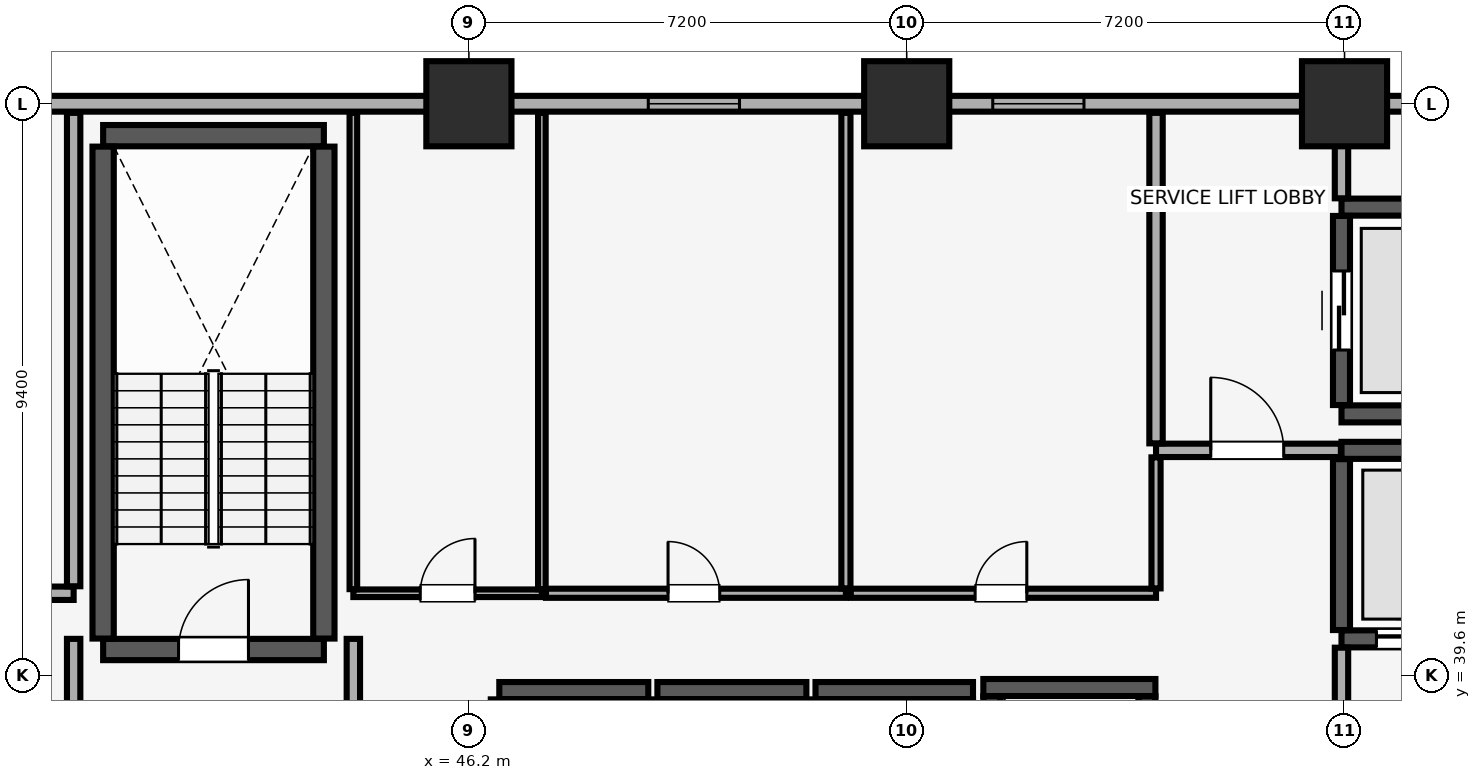
"""IFC4 building model, lengths in metres.
Left out: names, types, materials, properties, quantities, classifications, styles, units other than length and angle.
Written with IfcOpenShell. Run it as: python <this file> out.ifc"""

import sys

from ifc_helpers import new_model, si_unit, direction, frame, frame_2d, origin, origin_2d, place, context, subcontext, project, spatial, rectangle, extrude, element, fill, save


model = new_model("IFC4")
c1 = context("Model", 3, precision=1e-05, world=origin(), true_north=direction((0.0, 1.0)))
c2 = subcontext(c1, "Body", "Model", "MODEL_VIEW")
j1 = project(units=[si_unit("LENGTHUNIT", "METRE"), si_unit("PLANEANGLEUNIT", "RADIAN")], contexts=[c1])
p1 = place(None, origin())
s1 = spatial("IfcSite", under=j1, at=p1, CompositionType="ELEMENT")
p2 = place(p1, origin())
s2 = spatial("IfcBuilding", under=s1, at=p2, CompositionType="ELEMENT")
p3 = place(p2, frame((0.0, 0.0, 31.4)))
s3 = spatial("IfcBuildingStorey", under=s2, at=p3, CompositionType="ELEMENT", Elevation=31.4)
for number, where, z_axis, x_axis in (
    (1, (46.2, 49.0, 0.0), (0.0, 0.0, 1.0), (1.0, 0.0, 0.0)),
    (2, (53.4, 49.0, 0.0), (0.0, 0.0, 1.0), (1.0, 0.0, 0.0)),
    (3, (60.6, 49.0, 0.0), (0.0, 0.0, 1.0), (1.0, 0.0, 0.0)),
):
    element("IfcColumn", number, at=place(p3, frame(where, z_axis=z_axis, x_axis=x_axis)), inside=s3, PredefinedType="COLUMN", context=c2, shape_type="SweptSolid", body=[
        extrude(rectangle(XDim=1.4, YDim=1.4, at=origin_2d()), origin(), (0.0, 0.0, 1.0), 3.51),
    ])
p4 = place(p3, frame((79.8, 49.0, 0.0), z_axis=(0.0, 0.0, 1.0), x_axis=(-1.0, 0.0, 0.0)))
e4 = element("IfcWall", 4, at=p4, inside=s3, PredefinedType="SOLIDWALL", context=c2, shape_type="SweptSolid", body=[
    extrude(rectangle(XDim=75.6, YDim=0.26, at=frame_2d((37.8, 0.0))), origin(), (0.0, 0.0, 1.0), 2.56),
])
p5 = place(p4, frame((72.565, 0.0, 0.85)))
e5 = element("IfcOpeningElement", 5, at=p5, cuts=e4, PredefinedType="OPENING", context=c2, shape_type="SweptSolid", body=[
    extrude(rectangle(XDim=1.5, YDim=1.4, at=frame_2d((0.75, 0.7))), frame((0.0, 0.14, 0.0), z_axis=(0.0, -1.0, 0.0), x_axis=(1.0, 0.0, 0.0)), (0.0, 0.0, 1.0), 0.28),
])
p6 = place(p4, frame((67.45, 0.0, 0.85)))
e6 = element("IfcOpeningElement", 6, at=p6, cuts=e4, PredefinedType="OPENING", context=c2, shape_type="SweptSolid", body=[
    extrude(rectangle(XDim=1.5, YDim=1.4, at=frame_2d((0.75, 0.7))), frame((0.0, 0.14, 0.0), z_axis=(0.0, -1.0, 0.0), x_axis=(1.0, 0.0, 0.0)), (0.0, 0.0, 1.0), 0.28),
])
p7 = place(p4, frame((6.65, 0.0, 0.85)))
e7 = element("IfcOpeningElement", 7, at=p7, cuts=e4, PredefinedType="OPENING", context=c2, shape_type="SweptSolid", body=[
    extrude(rectangle(XDim=1.5, YDim=1.4, at=frame_2d((0.75, 0.7))), frame((0.0, 0.14, 0.0), z_axis=(0.0, -1.0, 0.0), x_axis=(1.0, 0.0, 0.0)), (0.0, 0.0, 1.0), 0.28),
])
p8 = place(p4, frame((1.535, 0.0, 0.85)))
e8 = element("IfcOpeningElement", 8, at=p8, cuts=e4, PredefinedType="OPENING", context=c2, shape_type="SweptSolid", body=[
    extrude(rectangle(XDim=1.5, YDim=1.4, at=frame_2d((0.75, 0.7))), frame((0.0, 0.14, 0.0), z_axis=(0.0, -1.0, 0.0), x_axis=(1.0, 0.0, 0.0)), (0.0, 0.0, 1.0), 0.28),
])
p9 = place(p4, frame((51.365, 0.0, 0.9)))
e9 = element("IfcOpeningElement", 9, at=p9, cuts=e4, PredefinedType="OPENING", context=c2, shape_type="SweptSolid", body=[
    extrude(rectangle(XDim=1.5, YDim=1.4, at=frame_2d((0.75, 0.7))), frame((0.0, 0.14, 0.0), z_axis=(0.0, -1.0, 0.0), x_axis=(1.0, 0.0, 0.0)), (0.0, 0.0, 1.0), 0.28),
])
p10 = place(p4, frame((46.0, 0.0, 0.9)))
e10 = element("IfcOpeningElement", 10, at=p10, cuts=e4, PredefinedType="OPENING", context=c2, shape_type="SweptSolid", body=[
    extrude(rectangle(XDim=1.5, YDim=1.4, at=frame_2d((0.75, 0.7))), frame((0.0, 0.14, 0.0), z_axis=(0.0, -1.0, 0.0), x_axis=(1.0, 0.0, 0.0)), (0.0, 0.0, 1.0), 0.28),
])
p11 = place(p4, frame((29.15, 0.0, 0.9)))
e11 = element("IfcOpeningElement", 11, at=p11, cuts=e4, PredefinedType="OPENING", context=c2, shape_type="SweptSolid", body=[
    extrude(rectangle(XDim=1.5, YDim=1.4, at=frame_2d((0.75, 0.7))), frame((0.0, 0.14, 0.0), z_axis=(0.0, -1.0, 0.0), x_axis=(1.0, 0.0, 0.0)), (0.0, 0.0, 1.0), 0.28),
])
p12 = place(p4, frame((23.485, 0.0, 0.9)))
e12 = element("IfcOpeningElement", 12, at=p12, cuts=e4, PredefinedType="OPENING", context=c2, shape_type="SweptSolid", body=[
    extrude(rectangle(XDim=1.5, YDim=1.4, at=frame_2d((0.75, 0.7))), frame((0.0, 0.14, 0.0), z_axis=(0.0, -1.0, 0.0), x_axis=(1.0, 0.0, 0.0)), (0.0, 0.0, 1.0), 0.28),
])
p13 = place(p3, frame((40.185, 40.025, 0.0), z_axis=(0.0, 0.0, 1.0), x_axis=(1.0, 0.0, 0.0)))
e13 = element("IfcWall", 13, at=p13, inside=s3, PredefinedType="SHEAR", context=c2, shape_type="SweptSolid", body=[
    extrude(rectangle(XDim=3.63, YDim=0.35, at=frame_2d((1.815, 0.0))), origin(), (0.0, 0.0, 1.0), 3.51),
])
p14 = place(p13, frame((1.24, 0.0, 0.0)))
e14 = element("IfcOpeningElement", 14, at=p14, cuts=e13, PredefinedType="OPENING", context=c2, shape_type="SweptSolid", body=[
    extrude(rectangle(XDim=1.15, YDim=2.15, at=frame_2d((0.575, 1.075))), frame((0.0, 0.185, 0.0), z_axis=(0.0, -1.0, 0.0), x_axis=(1.0, 0.0, 0.0)), (0.0, 0.0, 1.0), 0.37),
])
p15 = place(p3, frame((40.185, 48.475, 0.0), z_axis=(0.0, 0.0, 1.0), x_axis=(1.0, 0.0, 0.0)))
e15 = element("IfcWall", 15, at=p15, inside=s3, PredefinedType="SHEAR", context=c2, shape_type="SweptSolid", body=[
    extrude(rectangle(XDim=3.63, YDim=0.35, at=frame_2d((1.815, 0.0))), origin(), (0.0, 0.0, 1.0), 3.51),
])
for number, where, z_axis, x_axis in (
    (16, (40.185, 40.205, 0.0), (0.0, 0.0, 1.0), (0.0, 1.0, 0.0)),
    (17, (43.815, 40.205, 0.0), (0.0, 0.0, 1.0), (0.0, 1.0, 0.0)),
):
    element("IfcWall", number, at=place(p3, frame(where, z_axis=z_axis, x_axis=x_axis)), inside=s3, PredefinedType="SHEAR", context=c2, shape_type="SweptSolid", body=[
        extrude(rectangle(XDim=8.09, YDim=0.35, at=frame_2d((4.045, 0.0))), origin(), (0.0, 0.0, 1.0), 3.51),
    ])
p16 = place(p3, frame((46.7, 39.35, 0.0), z_axis=(0.0, 0.0, 1.0), x_axis=(1.0, 0.0, 0.0)))
e18 = element("IfcWall", 18, at=p16, inside=s3, PredefinedType="SHEAR", context=c2, shape_type="SweptSolid", body=[
    extrude(rectangle(XDim=2.45, YDim=0.28, at=frame_2d((1.225, 0.0))), origin(), (0.0, 0.0, 1.0), 3.51),
])
for number, where, z_axis, x_axis in (
    (19, (46.7, 37.145, 0.0), (0.0, 0.0, 1.0), (0.0, 1.0, 0.0)),
    (20, (49.15, 37.145, 0.0), (0.0, 0.0, 1.0), (0.0, 1.0, 0.0)),
):
    element("IfcWall", number, at=place(p3, frame(where, z_axis=z_axis, x_axis=x_axis)), inside=s3, PredefinedType="SHEAR", context=c2, shape_type="SweptSolid", body=[
        extrude(rectangle(XDim=2.06, YDim=0.28, at=frame_2d((1.03, 0.0))), origin(), (0.0, 0.0, 1.0), 3.51),
    ])
p17 = place(p3, frame((49.3, 39.35, 0.0), z_axis=(0.0, 0.0, 1.0), x_axis=(1.0, 0.0, 0.0)))
e21 = element("IfcWall", 21, at=p17, inside=s3, PredefinedType="SHEAR", context=c2, shape_type="SweptSolid", body=[
    extrude(rectangle(XDim=2.45, YDim=0.28, at=frame_2d((1.225, 0.0))), origin(), (0.0, 0.0, 1.0), 3.51),
])
p18 = place(p3, frame((51.75, 37.145, 0.0), z_axis=(0.0, 0.0, 1.0), x_axis=(0.0, 1.0, 0.0)))
e22 = element("IfcWall", 22, at=p18, inside=s3, PredefinedType="SHEAR", context=c2, shape_type="SweptSolid", body=[
    extrude(rectangle(XDim=2.06, YDim=0.28, at=frame_2d((1.03, 0.0))), origin(), (0.0, 0.0, 1.0), 3.51),
])
p19 = place(p3, frame((51.9, 39.35, 0.0), z_axis=(0.0, 0.0, 1.0), x_axis=(1.0, 0.0, 0.0)))
e23 = element("IfcWall", 23, at=p19, inside=s3, PredefinedType="SHEAR", context=c2, shape_type="SweptSolid", body=[
    extrude(rectangle(XDim=2.59, YDim=0.28, at=frame_2d((1.295, 0.0))), origin(), (0.0, 0.0, 1.0), 3.51),
])
p20 = place(p3, frame((54.35, 37.145, 0.0), z_axis=(0.0, 0.0, 1.0), x_axis=(0.0, 1.0, 0.0)))
e24 = element("IfcWall", 24, at=p20, inside=s3, PredefinedType="SHEAR", context=c2, shape_type="SweptSolid", body=[
    extrude(rectangle(XDim=2.06, YDim=0.28, at=frame_2d((1.03, 0.0))), origin(), (0.0, 0.0, 1.0), 3.51),
])
p21 = place(p3, frame((54.66, 39.4, 0.0), z_axis=(0.0, 0.0, 1.0), x_axis=(1.0, 0.0, 0.0)))
e25 = element("IfcWall", 25, at=p21, inside=s3, PredefinedType="SHEAR", context=c2, shape_type="SweptSolid", body=[
    extrude(rectangle(XDim=2.83, YDim=0.28, at=frame_2d((1.415, 0.0))), origin(), (0.0, 0.0, 1.0), 3.51),
])
for number, where, z_axis, x_axis in (
    (26, (54.8, 37.145, 0.0), (0.0, 0.0, 1.0), (0.0, 1.0, 0.0)),
    (27, (57.35, 37.145, 0.0), (0.0, 0.0, 1.0), (0.0, 1.0, 0.0)),
):
    element("IfcWall", number, at=place(p3, frame(where, z_axis=z_axis, x_axis=x_axis)), inside=s3, PredefinedType="SHEAR", context=c2, shape_type="SweptSolid", body=[
        extrude(rectangle(XDim=2.11, YDim=0.28, at=frame_2d((1.055, 0.0))), origin(), (0.0, 0.0, 1.0), 3.51),
    ])
p22 = place(p3, frame((60.55, 40.2, 0.0), z_axis=(0.0, 0.0, 1.0), x_axis=(1.0, 0.0, 0.0)))
e28 = element("IfcWall", 28, at=p22, inside=s3, PredefinedType="SHEAR", context=c2, shape_type="SweptSolid", body=[
    extrude(rectangle(XDim=2.415, YDim=0.28, at=frame_2d((1.208, 0.0))), origin(), (0.0, 0.0, 1.0), 3.51),
])
p23 = place(p22, frame((0.575, 0.0, 0.0)))
e29 = element("IfcOpeningElement", 29, at=p23, cuts=e28, PredefinedType="OPENING", context=c2, shape_type="SweptSolid", body=[
    extrude(rectangle(XDim=1.3, YDim=2.3, at=frame_2d((0.65, 1.15))), frame((0.0, 0.15, 0.0), z_axis=(0.0, -1.0, 0.0), x_axis=(1.0, 0.0, 0.0)), (0.0, 0.0, 1.0), 0.3),
])
p24 = place(p3, frame((60.55, 43.3, 0.0), z_axis=(0.0, 0.0, 1.0), x_axis=(1.0, 0.0, 0.0)))
e30 = element("IfcWall", 30, at=p24, inside=s3, PredefinedType="SHEAR", context=c2, shape_type="SweptSolid", body=[
    extrude(rectangle(XDim=2.415, YDim=0.28, at=frame_2d((1.208, 0.0))), origin(), (0.0, 0.0, 1.0), 3.51),
])
p25 = place(p3, frame((60.55, 40.345, 0.0), z_axis=(0.0, 0.0, 1.0), x_axis=(0.0, 1.0, 0.0)))
e31 = element("IfcWall", 31, at=p25, inside=s3, PredefinedType="SHEAR", context=c2, shape_type="SweptSolid", body=[
    extrude(rectangle(XDim=2.81, YDim=0.28, at=frame_2d((1.405, 0.0))), origin(), (0.0, 0.0, 1.0), 3.51),
])
for number, where, z_axis, x_axis in (
    (32, (60.55, 43.9, 0.0), (0.0, 0.0, 1.0), (1.0, 0.0, 0.0)),
    (33, (60.55, 47.3, 0.0), (0.0, 0.0, 1.0), (1.0, 0.0, 0.0)),
):
    element("IfcWall", number, at=place(p3, frame(where, z_axis=z_axis, x_axis=x_axis)), inside=s3, PredefinedType="SHEAR", context=c2, shape_type="SweptSolid", body=[
        extrude(rectangle(XDim=2.415, YDim=0.28, at=frame_2d((1.208, 0.0))), origin(), (0.0, 0.0, 1.0), 3.51),
    ])
p26 = place(p3, frame((60.55, 44.045, 0.0), z_axis=(0.0, 0.0, 1.0), x_axis=(0.0, 1.0, 0.0)))
e34 = element("IfcWall", 34, at=p26, inside=s3, PredefinedType="SHEAR", context=c2, shape_type="SweptSolid", body=[
    extrude(rectangle(XDim=3.11, YDim=0.28, at=frame_2d((1.555, 0.0))), origin(), (0.0, 0.0, 1.0), 3.51),
])
p27 = place(p26, frame((0.905, 0.0, 0.0)))
e35 = element("IfcOpeningElement", 35, at=p27, cuts=e34, PredefinedType="OPENING", context=c2, shape_type="SweptSolid", body=[
    extrude(rectangle(XDim=1.3, YDim=2.3, at=frame_2d((0.65, 1.15))), frame((0.0, 0.15, 0.0), z_axis=(0.0, -1.0, 0.0), x_axis=(1.0, 0.0, 0.0)), (0.0, 0.0, 1.0), 0.3),
])
p28 = place(p3, frame((60.55, 34.415, 0.0), z_axis=(0.0, 0.0, 1.0), x_axis=(0.0, 1.0, 0.0)))
e36 = element("IfcWall", 36, at=p28, inside=s3, PredefinedType="PARTITIONING", context=c2, shape_type="SweptSolid", body=[
    extrude(rectangle(XDim=5.64, YDim=0.22, at=frame_2d((2.82, 0.0))), origin(), (0.0, 0.0, 1.0), 3.51),
])
for number, where, z_axis, x_axis in (
    (37, (39.7, 34.415, 0.0), (0.0, 0.0, 1.0), (0.0, 1.0, 0.0)),
    (38, (44.3, 34.415, 0.0), (0.0, 0.0, 1.0), (0.0, 1.0, 0.0)),
):
    element("IfcWall", number, at=place(p3, frame(where, z_axis=z_axis, x_axis=x_axis)), inside=s3, PredefinedType="PARTITIONING", context=c2, shape_type="SweptSolid", body=[
        extrude(rectangle(XDim=5.785, YDim=0.22, at=frame_2d((2.893, 0.0))), origin(), (0.0, 0.0, 1.0), 3.51),
    ])
p29 = place(p3, frame((57.5, 43.3, 0.0), z_axis=(0.0, 0.0, 1.0), x_axis=(1.0, 0.0, 0.0)))
e39 = element("IfcWall", 39, at=p29, inside=s3, PredefinedType="PARTITIONING", context=c2, shape_type="SweptSolid", body=[
    extrude(rectangle(XDim=3.04, YDim=0.22, at=frame_2d((1.52, 0.0))), origin(), (0.0, 0.0, 1.0), 3.51),
])
p30 = place(p29, frame((0.9, 0.0, 0.0)))
e40 = element("IfcOpeningElement", 40, at=p30, cuts=e39, PredefinedType="OPENING", context=c2, shape_type="SweptSolid", body=[
    extrude(rectangle(XDim=1.2, YDim=2.15, at=frame_2d((0.6, 1.075))), frame((0.0, 0.12, 0.0), z_axis=(0.0, -1.0, 0.0), x_axis=(1.0, 0.0, 0.0)), (0.0, 0.0, 1.0), 0.24),
])
p31 = place(p3, frame((57.5, 43.415, 0.0), z_axis=(0.0, 0.0, 1.0), x_axis=(0.0, 1.0, 0.0)))
e41 = element("IfcWall", 41, at=p31, inside=s3, PredefinedType="PARTITIONING", context=c2, shape_type="SweptSolid", body=[
    extrude(rectangle(XDim=5.435, YDim=0.22, at=frame_2d((2.718, 0.0))), origin(), (0.0, 0.0, 1.0), 3.51),
])
p32 = place(p3, frame((60.55, 47.445, 0.0), z_axis=(0.0, 0.0, 1.0), x_axis=(0.0, 1.0, 0.0)))
e42 = element("IfcWall", 42, at=p32, inside=s3, PredefinedType="PARTITIONING", context=c2, shape_type="SweptSolid", body=[
    extrude(rectangle(XDim=1.405, YDim=0.22, at=frame_2d((0.703, 0.0))), origin(), (0.0, 0.0, 1.0), 3.51),
])
p33 = place(p3, frame((35.18, 40.95, 0.0), z_axis=(0.0, 0.0, 1.0), x_axis=(1.0, 0.0, 0.0)))
e43 = element("IfcWall", 43, at=p33, inside=s3, PredefinedType="PARTITIONING", context=c2, shape_type="SweptSolid", body=[
    extrude(rectangle(XDim=4.52, YDim=0.22, at=frame_2d((2.26, 0.0))), origin(), (0.0, 0.0, 1.0), 3.51),
])
p34 = place(p33, frame((0.795, 0.0, 0.0)))
e44 = element("IfcOpeningElement", 44, at=p34, cuts=e43, PredefinedType="OPENING", context=c2, shape_type="SweptSolid", body=[
    extrude(rectangle(XDim=0.85, YDim=2.1, at=frame_2d((0.425, 1.05))), frame((0.0, 0.12, 0.0), z_axis=(0.0, -1.0, 0.0), x_axis=(1.0, 0.0, 0.0)), (0.0, 0.0, 1.0), 0.24),
])
p35 = place(p3, frame((39.7, 41.065, 0.0), z_axis=(0.0, 0.0, 1.0), x_axis=(0.0, 1.0, 0.0)))
e45 = element("IfcWall", 45, at=p35, inside=s3, PredefinedType="PARTITIONING", context=c2, shape_type="SweptSolid", body=[
    extrude(rectangle(XDim=7.785, YDim=0.22, at=frame_2d((3.893, 0.0))), origin(), (0.0, 0.0, 1.0), 3.51),
])
p36 = place(p3, frame((44.3, 40.95, 0.0), z_axis=(0.0, 0.0, 1.0), x_axis=(1.0, 0.0, 0.0)))
e46 = element("IfcWall", 46, at=p36, inside=s3, PredefinedType="PARTITIONING", context=c2, shape_type="SweptSolid", body=[
    extrude(rectangle(XDim=3.1, YDim=0.125, at=frame_2d((1.55, 0.0))), origin(), (0.0, 0.0, 1.0), 3.51),
])
p37 = place(p36, frame((1.1, 0.0, 0.0)))
e47 = element("IfcOpeningElement", 47, at=p37, cuts=e46, PredefinedType="OPENING", context=c2, shape_type="SweptSolid", body=[
    extrude(rectangle(XDim=0.9, YDim=2.1, at=frame_2d((0.45, 1.05))), frame((0.0, 0.073, 0.0), z_axis=(0.0, -1.0, 0.0), x_axis=(1.0, 0.0, 0.0)), (0.0, 0.0, 1.0), 0.145),
])
for number, where, z_axis, x_axis in (
    (48, (44.3, 41.018, 0.0), (0.0, 0.0, 1.0), (0.0, 1.0, 0.0)),
    (49, (47.4, 41.018, 0.0), (0.0, 0.0, 1.0), (0.0, 1.0, 0.0)),
):
    element("IfcWall", number, at=place(p3, frame(where, z_axis=z_axis, x_axis=x_axis)), inside=s3, PredefinedType="PARTITIONING", context=c2, shape_type="SweptSolid", body=[
        extrude(rectangle(XDim=7.833, YDim=0.125, at=frame_2d((3.916, 0.0))), origin(), (0.0, 0.0, 1.0), 3.51),
    ])
p38 = place(p3, frame((47.468, 40.95, 0.0), z_axis=(0.0, 0.0, 1.0), x_axis=(1.0, 0.0, 0.0)))
e50 = element("IfcWall", 50, at=p38, inside=s3, PredefinedType="PARTITIONING", context=c2, shape_type="SweptSolid", body=[
    extrude(rectangle(XDim=4.932, YDim=0.15, at=frame_2d((2.466, 0.0))), origin(), (0.0, 0.0, 1.0), 3.51),
])
p39 = place(p38, frame((2.008, 0.0, 0.0)))
e51 = element("IfcOpeningElement", 51, at=p39, cuts=e50, PredefinedType="OPENING", context=c2, shape_type="SweptSolid", body=[
    extrude(rectangle(XDim=0.85, YDim=2.1, at=frame_2d((0.425, 1.05))), frame((0.0, 0.085, 0.0), z_axis=(0.0, -1.0, 0.0), x_axis=(1.0, 0.0, 0.0)), (0.0, 0.0, 1.0), 0.17),
])
p40 = place(p3, frame((52.4, 41.03, 0.0), z_axis=(0.0, 0.0, 1.0), x_axis=(0.0, 1.0, 0.0)))
e52 = element("IfcWall", 52, at=p40, inside=s3, PredefinedType="PARTITIONING", context=c2, shape_type="SweptSolid", body=[
    extrude(rectangle(XDim=7.82, YDim=0.15, at=frame_2d((3.91, 0.0))), origin(), (0.0, 0.0, 1.0), 3.51),
])
p41 = place(p3, frame((52.48, 40.95, 0.0), z_axis=(0.0, 0.0, 1.0), x_axis=(1.0, 0.0, 0.0)))
e53 = element("IfcWall", 53, at=p41, inside=s3, PredefinedType="PARTITIONING", context=c2, shape_type="SweptSolid", body=[
    extrude(rectangle(XDim=5.02, YDim=0.15, at=frame_2d((2.51, 0.0))), origin(), (0.0, 0.0, 1.0), 3.51),
])
p42 = place(p41, frame((2.045, 0.0, 0.0)))
e54 = element("IfcOpeningElement", 54, at=p42, cuts=e53, PredefinedType="OPENING", context=c2, shape_type="SweptSolid", body=[
    extrude(rectangle(XDim=0.85, YDim=2.1, at=frame_2d((0.425, 1.05))), frame((0.0, 0.085, 0.0), z_axis=(0.0, -1.0, 0.0), x_axis=(1.0, 0.0, 0.0)), (0.0, 0.0, 1.0), 0.17),
])
p43 = place(p3, frame((57.5, 41.03, 0.0), z_axis=(0.0, 0.0, 1.0), x_axis=(0.0, 1.0, 0.0)))
e55 = element("IfcWall", 55, at=p43, inside=s3, PredefinedType="PARTITIONING", context=c2, shape_type="SweptSolid", body=[
    extrude(rectangle(XDim=2.155, YDim=0.15, at=frame_2d((1.078, 0.0))), origin(), (0.0, 0.0, 1.0), 3.51),
])
p44 = place(p11, origin())
e56 = element("IfcWindow", 56, at=p44, inside=s3, PartitioningType="SINGLE_PANEL", PredefinedType="WINDOW", context=c2, shape_type="SweptSolid", body=[
    extrude(rectangle(XDim=1.5, YDim=1.4, at=frame_2d((0.75, 0.7))), frame((0.0, 0.03, 0.0), z_axis=(0.0, -1.0, 0.0), x_axis=(1.0, 0.0, 0.0)), (0.0, 0.0, 1.0), 0.06),
])
fill(e11, e56)
p45 = place(p12, origin())
e57 = element("IfcWindow", 57, at=p45, inside=s3, PartitioningType="SINGLE_PANEL", PredefinedType="WINDOW", context=c2, shape_type="SweptSolid", body=[
    extrude(rectangle(XDim=1.5, YDim=1.4, at=frame_2d((0.75, 0.7))), frame((0.0, 0.03, 0.0), z_axis=(0.0, -1.0, 0.0), x_axis=(1.0, 0.0, 0.0)), (0.0, 0.0, 1.0), 0.06),
])
fill(e12, e57)
p46 = place(p14, origin())
e58 = element("IfcDoor", 58, at=p46, inside=s3, OperationType="SINGLE_SWING_RIGHT", PredefinedType="DOOR", context=c2, shape_type="SweptSolid", body=[
    extrude(rectangle(XDim=1.15, YDim=2.15, at=frame_2d((0.575, 1.075))), frame((0.0, 0.025, 0.0), z_axis=(0.0, -1.0, 0.0), x_axis=(1.0, 0.0, 0.0)), (0.0, 0.0, 1.0), 0.05),
])
fill(e14, e58)
p47 = place(p23, origin())
e59 = element("IfcDoor", 59, at=p47, inside=s3, OperationType="DOUBLE_DOOR_SLIDING", PredefinedType="DOOR", context=c2, shape_type="SweptSolid", body=[
    extrude(rectangle(XDim=1.3, YDim=2.3, at=frame_2d((0.65, 1.15))), frame((0.0, 0.025, 0.0), z_axis=(0.0, -1.0, 0.0), x_axis=(1.0, 0.0, 0.0)), (0.0, 0.0, 1.0), 0.05),
])
fill(e29, e59)
p48 = place(p27, origin())
e60 = element("IfcDoor", 60, at=p48, inside=s3, OperationType="DOUBLE_DOOR_SLIDING", PredefinedType="DOOR", context=c2, shape_type="SweptSolid", body=[
    extrude(rectangle(XDim=1.3, YDim=2.3, at=frame_2d((0.65, 1.15))), frame((0.0, 0.025, 0.0), z_axis=(0.0, -1.0, 0.0), x_axis=(1.0, 0.0, 0.0)), (0.0, 0.0, 1.0), 0.05),
])
fill(e35, e60)
p49 = place(p30, origin())
e61 = element("IfcDoor", 61, at=p49, inside=s3, OperationType="SINGLE_SWING_LEFT", PredefinedType="DOOR", context=c2, shape_type="SweptSolid", body=[
    extrude(rectangle(XDim=1.2, YDim=2.15, at=frame_2d((0.6, 1.075))), frame((0.0, 0.025, 0.0), z_axis=(0.0, -1.0, 0.0), x_axis=(1.0, 0.0, 0.0)), (0.0, 0.0, 1.0), 0.05),
])
fill(e40, e61)
p50 = place(p37, origin())
e62 = element("IfcDoor", 62, at=p50, inside=s3, OperationType="SINGLE_SWING_RIGHT", PredefinedType="DOOR", context=c2, shape_type="SweptSolid", body=[
    extrude(rectangle(XDim=0.9, YDim=2.1, at=frame_2d((0.45, 1.05))), frame((0.0, 0.025, 0.0), z_axis=(0.0, -1.0, 0.0), x_axis=(1.0, 0.0, 0.0)), (0.0, 0.0, 1.0), 0.05),
])
fill(e47, e62)
p51 = place(p39, origin())
e63 = element("IfcDoor", 63, at=p51, inside=s3, OperationType="SINGLE_SWING_LEFT", PredefinedType="DOOR", context=c2, shape_type="SweptSolid", body=[
    extrude(rectangle(XDim=0.85, YDim=2.1, at=frame_2d((0.425, 1.05))), frame((0.0, 0.025, 0.0), z_axis=(0.0, -1.0, 0.0), x_axis=(1.0, 0.0, 0.0)), (0.0, 0.0, 1.0), 0.05),
])
fill(e51, e63)
p52 = place(p42, origin())
e64 = element("IfcDoor", 64, at=p52, inside=s3, OperationType="SINGLE_SWING_RIGHT", PredefinedType="DOOR", context=c2, shape_type="SweptSolid", body=[
    extrude(rectangle(XDim=0.85, YDim=2.1, at=frame_2d((0.425, 1.05))), frame((0.0, 0.025, 0.0), z_axis=(0.0, -1.0, 0.0), x_axis=(1.0, 0.0, 0.0)), (0.0, 0.0, 1.0), 0.05),
])
fill(e54, e64)
save(model, sys.argv[1])
